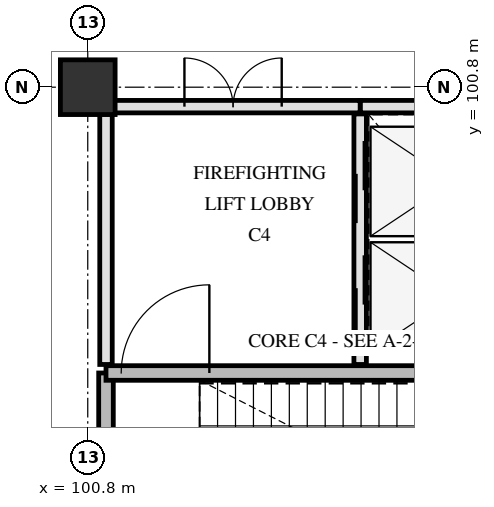
"""IFC4 building model, lengths in metres.
Left out: names, types, materials, properties, quantities, classifications, styles, units other than length and angle.
Written with IfcOpenShell. Run it as: python <this file> out.ifc"""

import sys

from ifc_helpers import new_model, si_unit, direction, frame, frame_2d, origin, origin_2d, place, context, subcontext, project, spatial, rectangle, extrude, element, fill, save


model = new_model("IFC4")
c1 = context("Model", 3, precision=1e-05, world=origin(), true_north=direction((0.0, 1.0)))
c2 = subcontext(c1, "Body", "Model", "MODEL_VIEW")
j1 = project(units=[si_unit("LENGTHUNIT", "METRE"), si_unit("PLANEANGLEUNIT", "RADIAN")], contexts=[c1])
p1 = place(None, origin())
s1 = spatial("IfcSite", under=j1, at=p1, CompositionType="ELEMENT")
p2 = place(p1, origin())
s2 = spatial("IfcBuilding", under=s1, at=p2, CompositionType="ELEMENT")
p3 = place(p2, origin())
s3 = spatial("IfcBuildingStorey", under=s2, at=p3, CompositionType="ELEMENT", Elevation=0.0)
p4 = place(p3, frame((100.8, 100.8, 0.0), z_axis=(0.0, 0.0, 1.0), x_axis=(1.0, 0.0, 0.0)))
e1 = element("IfcColumn", 1, at=p4, inside=s3, PredefinedType="COLUMN", context=c2, shape_type="SweptSolid", body=[
    extrude(rectangle(XDim=0.9, YDim=0.9, at=origin_2d()), origin(), (0.0, 0.0, 1.0), 4.8),
])
p5 = place(p3, frame((101.1, 92.78, 0.0), z_axis=(0.0, 0.0, 1.0), x_axis=(0.0, 1.0, 0.0)))
e2 = element("IfcWall", 2, at=p5, inside=s3, PredefinedType="SHEAR", context=c2, shape_type="SweptSolid", body=[
    extrude(rectangle(XDim=3.32, YDim=0.24, at=frame_2d((1.66, 0.0))), origin(), (0.0, 0.0, 1.0), 4.5),
])
p6 = place(p3, frame((101.1, 96.1, 0.0), z_axis=(0.0, 0.0, 1.0), x_axis=(1.0, 0.0, 0.0)))
e3 = element("IfcWall", 3, at=p6, inside=s3, PredefinedType="SHEAR", context=c2, shape_type="SweptSolid", body=[
    extrude(rectangle(XDim=7.82, YDim=0.24, at=frame_2d((3.91, 0.0))), origin(), (0.0, 0.0, 1.0), 4.5),
])
p7 = place(p6, frame((0.25, 0.0, 0.0)))
e4 = element("IfcOpeningElement", 4, at=p7, cuts=e3, PredefinedType="OPENING", context=c2, shape_type="SweptSolid", body=[
    extrude(rectangle(XDim=1.45, YDim=2.2, at=frame_2d((0.725, 1.1))), frame((0.0, 0.13, 0.0), z_axis=(0.0, -1.0, 0.0), x_axis=(1.0, 0.0, 0.0)), (0.0, 0.0, 1.0), 0.26),
])
p8 = place(p3, frame((105.28, 96.24, 0.0), z_axis=(0.0, 0.0, 1.0), x_axis=(0.0, 1.0, 0.0)))
e5 = element("IfcWall", 5, at=p8, inside=s3, PredefinedType="PARTITIONING", context=c2, shape_type="SweptSolid", body=[
    extrude(rectangle(XDim=4.12, YDim=0.205, at=frame_2d((2.06, 0.0))), origin(), (0.0, 0.0, 1.0), 4.49),
])
p9 = place(p8, frame((0.445, 0.0, 0.0)))
e6 = element("IfcOpeningElement", 6, at=p9, cuts=e5, PredefinedType="OPENING", context=c2, shape_type="SweptSolid", body=[
    extrude(rectangle(XDim=1.35, YDim=2.2, at=frame_2d((0.675, 1.1))), frame((0.0, 0.113, 0.0), z_axis=(0.0, -1.0, 0.0), x_axis=(1.0, 0.0, 0.0)), (0.0, 0.0, 1.0), 0.225),
])
p10 = place(p8, frame((2.325, 0.0, 0.0)))
e7 = element("IfcOpeningElement", 7, at=p10, cuts=e5, PredefinedType="OPENING", context=c2, shape_type="SweptSolid", body=[
    extrude(rectangle(XDim=1.35, YDim=2.2, at=frame_2d((0.675, 1.1))), frame((0.0, 0.113, 0.0), z_axis=(0.0, -1.0, 0.0), x_axis=(1.0, 0.0, 0.0)), (0.0, 0.0, 1.0), 0.225),
])
p11 = place(p3, frame((105.28, 100.48, 0.0), z_axis=(0.0, 0.0, 1.0), x_axis=(1.0, 0.0, 0.0)))
e8 = element("IfcWall", 8, at=p11, inside=s3, PredefinedType="PARTITIONING", context=c2, shape_type="SweptSolid", body=[
    extrude(rectangle(XDim=3.57, YDim=0.205, at=frame_2d((1.785, 0.0))), origin(), (0.0, 0.0, 1.0), 3.84),
])
p12 = place(p3, frame((101.1, 96.24, 0.0), z_axis=(0.0, 0.0, 1.0), x_axis=(0.0, 1.0, 0.0)))
e9 = element("IfcWall", 9, at=p12, inside=s3, PredefinedType="PARTITIONING", context=c2, shape_type="SweptSolid", body=[
    extrude(rectangle(XDim=4.12, YDim=0.205, at=frame_2d((2.06, 0.0))), origin(), (0.0, 0.0, 1.0), 3.89),
])
p13 = place(p3, frame((101.1, 100.48, 0.0), z_axis=(0.0, 0.0, 1.0), x_axis=(1.0, 0.0, 0.0)))
e10 = element("IfcWall", 10, at=p13, inside=s3, PredefinedType="PARTITIONING", context=c2, shape_type="SweptSolid", body=[
    extrude(rectangle(XDim=4.18, YDim=0.205, at=frame_2d((2.09, 0.0))), origin(), (0.0, 0.0, 1.0), 3.84),
])
p14 = place(p13, frame((1.29, 0.0, 0.0)))
e11 = element("IfcOpeningElement", 11, at=p14, cuts=e10, PredefinedType="OPENING", context=c2, shape_type="SweptSolid", body=[
    extrude(rectangle(XDim=1.6, YDim=2.25, at=frame_2d((0.8, 1.125))), frame((0.0, 0.113, 0.0), z_axis=(0.0, -1.0, 0.0), x_axis=(1.0, 0.0, 0.0)), (0.0, 0.0, 1.0), 0.225),
])
p15 = place(p7, origin())
e12 = element("IfcDoor", 12, at=p15, inside=s3, OperationType="SINGLE_SWING_RIGHT", PredefinedType="DOOR", context=c2, shape_type="SweptSolid", body=[
    extrude(rectangle(XDim=1.45, YDim=2.2, at=frame_2d((0.725, 1.1))), frame((0.0, 0.025, 0.0), z_axis=(0.0, -1.0, 0.0), x_axis=(1.0, 0.0, 0.0)), (0.0, 0.0, 1.0), 0.05),
])
fill(e4, e12)
p16 = place(p9, origin())
e13 = element("IfcDoor", 13, at=p16, inside=s3, OperationType="SLIDING_TO_LEFT", PredefinedType="DOOR", context=c2, shape_type="SweptSolid", body=[
    extrude(rectangle(XDim=1.35, YDim=2.2, at=frame_2d((0.675, 1.1))), frame((0.0, 0.025, 0.0), z_axis=(0.0, -1.0, 0.0), x_axis=(1.0, 0.0, 0.0)), (0.0, 0.0, 1.0), 0.05),
])
fill(e6, e13)
p17 = place(p10, origin())
e14 = element("IfcDoor", 14, at=p17, inside=s3, OperationType="SLIDING_TO_LEFT", PredefinedType="DOOR", context=c2, shape_type="SweptSolid", body=[
    extrude(rectangle(XDim=1.35, YDim=2.2, at=frame_2d((0.675, 1.1))), frame((0.0, 0.025, 0.0), z_axis=(0.0, -1.0, 0.0), x_axis=(1.0, 0.0, 0.0)), (0.0, 0.0, 1.0), 0.05),
])
fill(e7, e14)
p18 = place(p14, origin())
e15 = element("IfcDoor", 15, at=p18, inside=s3, OperationType="DOUBLE_SWING_LEFT", PredefinedType="DOOR", context=c2, shape_type="SweptSolid", body=[
    extrude(rectangle(XDim=1.6, YDim=2.25, at=frame_2d((0.8, 1.125))), frame((0.0, 0.025, 0.0), z_axis=(0.0, -1.0, 0.0), x_axis=(1.0, 0.0, 0.0)), (0.0, 0.0, 1.0), 0.05),
])
fill(e11, e15)
save(model, sys.argv[1])
